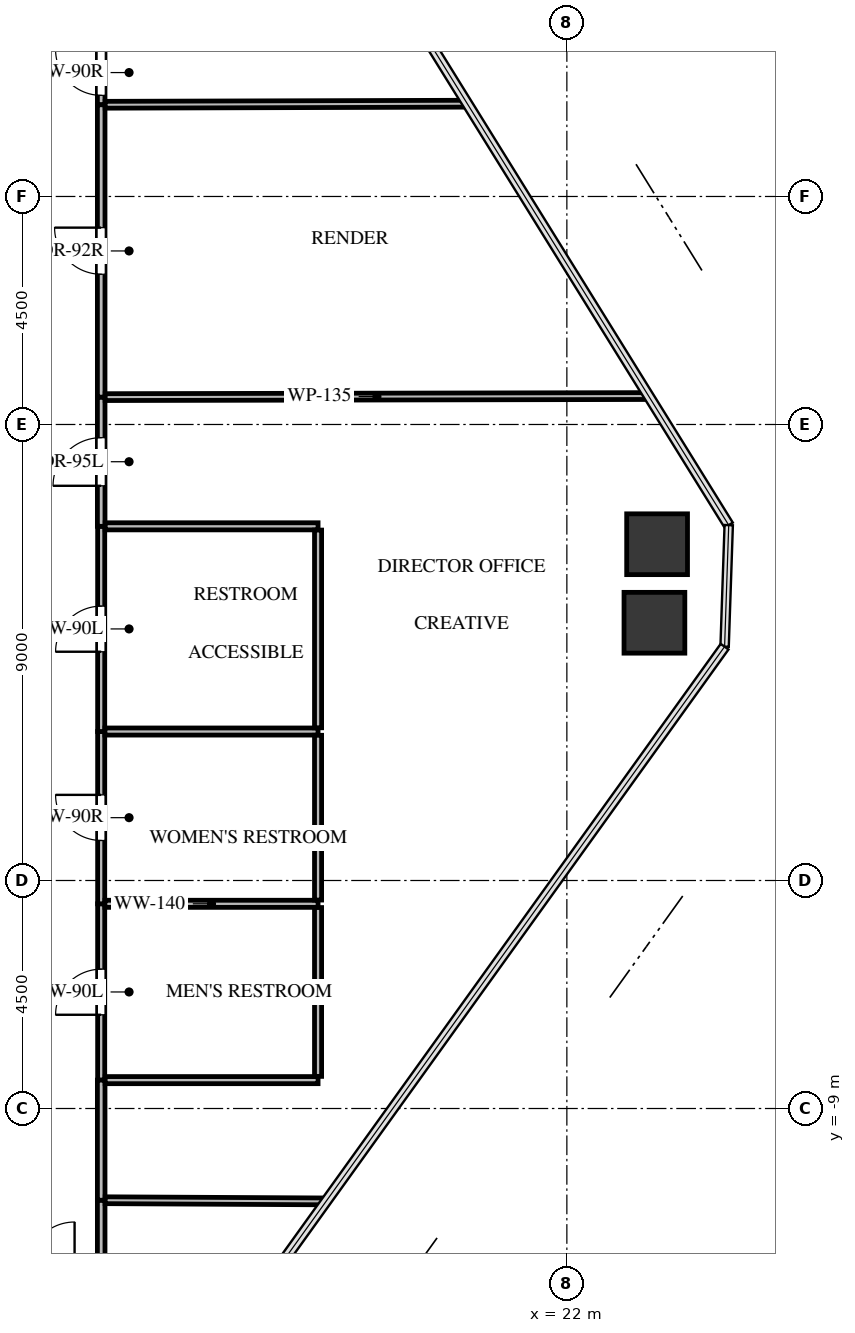
"""IFC4 building model, lengths in metres.
Left out: names, types, materials, properties, quantities, classifications, styles, units other than length and angle.
Written with IfcOpenShell. Run it as: python <this file> out.ifc"""

import sys

from ifc_helpers import new_model, si_unit, direction, frame, frame_2d, origin, origin_2d, place, context, subcontext, project, spatial, rectangle, extrude, source, transform, mapped, element, fill, save


model = new_model("IFC4")
c1 = context("Model", 3, precision=1e-05, world=origin(), true_north=direction((0.0, 1.0)))
c2 = subcontext(c1, "Body", "Model", "MODEL_VIEW")
j1 = project(units=[si_unit("LENGTHUNIT", "METRE"), si_unit("PLANEANGLEUNIT", "RADIAN")], contexts=[c1])
p1 = place(None, origin())
s1 = spatial("IfcSite", under=j1, at=p1, CompositionType="ELEMENT")
p2 = place(p1, origin())
s2 = spatial("IfcBuilding", under=s1, at=p2, CompositionType="ELEMENT")
p3 = place(p2, frame((0.0, 0.0, 110.7)))
s3 = spatial("IfcBuildingStorey", under=s2, at=p3, CompositionType="ELEMENT", Elevation=110.7)
m1 = source(origin(), c2, "Body", "SweptSolid", [
    extrude(rectangle(XDim=1.2, YDim=1.2, at=origin_2d()), origin(), (0.0, 0.0, 1.0), 3.3),
])
for number, where, z_axis, x_axis in (
    (1, (23.781, 2.137, -0.24), (0.0, 0.0, 1.0), (1.0, 0.0, 0.0)),
    (2, (23.728, 0.587, -0.24), (0.0, 0.0, 1.0), (1.0, 0.0, 0.0)),
):
    element("IfcColumn", number, at=place(p3, frame(where, z_axis=z_axis, x_axis=x_axis)), inside=s3, PredefinedType="COLUMN", context=c2, shape_type="MappedRepresentation", body=[
        mapped(m1, transform((0.0, 0.0, 0.0), x_axis=(1.0, 0.0, 0.0), y_axis=(0.0, 1.0, 0.0), z_axis=(0.0, 0.0, 1.0), scale=1.0)),
    ])
p4 = place(p3, frame((12.81, -8.44, 0.0), z_axis=(0.0, 0.0, 1.0), x_axis=(0.0, 1.0, 0.0)))
e3 = element("IfcWall", 3, at=p4, inside=s3, PredefinedType="PARTITIONING", context=c2, shape_type="SweptSolid", body=[
    extrude(rectangle(XDim=3.48, YDim=0.14, at=frame_2d((1.74, 0.0))), origin(), (0.0, 0.0, 1.0), 3.045),
])
p5 = place(p4, frame((1.29, 0.0, 0.0)))
e4 = element("IfcOpeningElement", 4, at=p5, cuts=e3, PredefinedType="OPENING", context=c2, shape_type="SweptSolid", body=[
    extrude(rectangle(XDim=0.9, YDim=2.05, at=frame_2d((0.45, 1.025))), frame((0.0, 0.08, 0.0), z_axis=(0.0, -1.0, 0.0), x_axis=(1.0, 0.0, 0.0)), (0.0, 0.0, 1.0), 0.16),
])
p6 = place(p3, frame((12.81, -4.96, 0.0), z_axis=(0.0, 0.0, 1.0), x_axis=(0.0, 1.0, 0.0)))
e5 = element("IfcWall", 5, at=p6, inside=s3, PredefinedType="PARTITIONING", context=c2, shape_type="SweptSolid", body=[
    extrude(rectangle(XDim=3.4, YDim=0.14, at=frame_2d((1.7, 0.0))), origin(), (0.0, 0.0, 1.0), 3.045),
])
p7 = place(p6, frame((1.25, 0.0, 0.0)))
e6 = element("IfcOpeningElement", 6, at=p7, cuts=e5, PredefinedType="OPENING", context=c2, shape_type="SweptSolid", body=[
    extrude(rectangle(XDim=0.9, YDim=2.05, at=frame_2d((0.45, 1.025))), frame((0.0, 0.08, 0.0), z_axis=(0.0, -1.0, 0.0), x_axis=(1.0, 0.0, 0.0)), (0.0, 0.0, 1.0), 0.16),
])
p8 = place(p3, frame((12.81, -1.56, 0.0), z_axis=(0.0, 0.0, 1.0), x_axis=(0.0, 1.0, 0.0)))
e7 = element("IfcWall", 7, at=p8, inside=s3, PredefinedType="PARTITIONING", context=c2, shape_type="SweptSolid", body=[
    extrude(rectangle(XDim=4.05, YDim=0.14, at=frame_2d((2.025, 0.0))), origin(), (0.0, 0.0, 1.0), 2.212),
])
p9 = place(p8, frame((1.575, 0.0, 0.0)))
e8 = element("IfcOpeningElement", 8, at=p9, cuts=e7, PredefinedType="OPENING", context=c2, shape_type="SweptSolid", body=[
    extrude(rectangle(XDim=0.9, YDim=2.05, at=frame_2d((0.45, 1.025))), frame((0.0, 0.08, 0.0), z_axis=(0.0, -1.0, 0.0), x_axis=(1.0, 0.0, 0.0)), (0.0, 0.0, 1.0), 0.16),
])
p10 = place(p3, frame((12.81, 10.81, 0.0), z_axis=(0.0, 0.0, 1.0), x_axis=(0.0, 1.0, 0.0)))
e9 = element("IfcWall", 9, at=p10, inside=s3, PredefinedType="PARTITIONING", context=c2, shape_type="SweptSolid", body=[
    extrude(rectangle(XDim=1.271, YDim=0.15, at=frame_2d((0.635, 0.0))), origin(), (0.0, 0.0, 1.0), 3.045),
])
p11 = place(p10, frame((0.186, 0.0, 0.0)))
e10 = element("IfcOpeningElement", 10, at=p11, cuts=e9, PredefinedType="OPENING", context=c2, shape_type="SweptSolid", body=[
    extrude(rectangle(XDim=0.9, YDim=2.05, at=frame_2d((0.45, 1.025))), frame((0.0, 0.085, 0.0), z_axis=(0.0, -1.0, 0.0), x_axis=(1.0, 0.0, 0.0)), (0.0, 0.0, 1.0), 0.17),
])
p12 = place(p3, frame((12.81, -12.081, 0.0), z_axis=(0.0, 0.0, 1.0), x_axis=(0.0, 1.0, 0.0)))
e11 = element("IfcWall", 11, at=p12, inside=s3, PredefinedType="PARTITIONING", context=c2, shape_type="SweptSolid", body=[
    extrude(rectangle(XDim=1.271, YDim=0.15, at=frame_2d((0.635, 0.0))), origin(), (0.0, 0.0, 1.0), 3.045),
])
p13 = place(p3, frame((12.81, 2.49, 0.0), z_axis=(0.0, 0.0, 1.0), x_axis=(0.0, 1.0, 0.0)))
e12 = element("IfcWall", 12, at=p13, inside=s3, PredefinedType="PARTITIONING", context=c2, shape_type="SweptSolid", body=[
    extrude(rectangle(XDim=2.55, YDim=0.15, at=frame_2d((1.275, 0.0))), origin(), (0.0, 0.0, 1.0), 3.045),
])
p14 = place(p13, frame((0.8, 0.0, 0.0)))
e13 = element("IfcOpeningElement", 13, at=p14, cuts=e12, PredefinedType="OPENING", context=c2, shape_type="SweptSolid", body=[
    extrude(rectangle(XDim=0.95, YDim=2.1, at=frame_2d((0.475, 1.05))), frame((0.0, 0.085, 0.0), z_axis=(0.0, -1.0, 0.0), x_axis=(1.0, 0.0, 0.0)), (0.0, 0.0, 1.0), 0.17),
])
p15 = place(p3, frame((12.81, -10.81, 0.0), z_axis=(0.0, 0.0, 1.0), x_axis=(0.0, 1.0, 0.0)))
e14 = element("IfcWall", 14, at=p15, inside=s3, PredefinedType="PARTITIONING", context=c2, shape_type="SweptSolid", body=[
    extrude(rectangle(XDim=2.37, YDim=0.15, at=frame_2d((1.185, 0.0))), origin(), (0.0, 0.0, 1.0), 3.045),
])
p16 = place(p3, frame((12.81, 5.04, 0.0), z_axis=(0.0, 0.0, 1.0), x_axis=(0.0, 1.0, 0.0)))
e15 = element("IfcWall", 15, at=p16, inside=s3, PredefinedType="PARTITIONING", context=c2, shape_type="SweptSolid", body=[
    extrude(rectangle(XDim=5.77, YDim=0.15, at=frame_2d((2.885, 0.0))), origin(), (0.0, 0.0, 1.0), 3.045),
])
p17 = place(p16, frame((2.425, 0.0, 0.0)))
e16 = element("IfcOpeningElement", 16, at=p17, cuts=e15, PredefinedType="OPENING", context=c2, shape_type="SweptSolid", body=[
    extrude(rectangle(XDim=0.92, YDim=2.1, at=frame_2d((0.46, 1.05))), frame((0.0, 0.085, 0.0), z_axis=(0.0, -1.0, 0.0), x_axis=(1.0, 0.0, 0.0)), (0.0, 0.0, 1.0), 0.17),
])
p18 = place(p3, frame((12.884, -4.96, 0.0), z_axis=(0.0, 0.0, 1.0), x_axis=(1.0, 0.0, 0.0)))
e17 = element("IfcWall", 17, at=p18, inside=s3, PredefinedType="PARTITIONING", context=c2, shape_type="SweptSolid", body=[
    extrude(rectangle(XDim=4.206, YDim=0.14, at=frame_2d((2.103, 0.0))), origin(), (0.0, 0.0, 1.0), 3.045),
])
p19 = place(p3, frame((17.09, -8.44, 0.0), z_axis=(0.0, 0.0, 1.0), x_axis=(-1.0, 0.0, 0.0)))
e18 = element("IfcWall", 18, at=p19, inside=s3, PredefinedType="PARTITIONING", context=c2, shape_type="SweptSolid", body=[
    extrude(rectangle(XDim=4.201, YDim=0.14, at=frame_2d((2.101, 0.0))), origin(), (0.0, 0.0, 1.0), 2.38),
])
p20 = place(p3, frame((17.09, -5.034, 0.0), z_axis=(0.0, 0.0, 1.0), x_axis=(0.0, -1.0, 0.0)))
e19 = element("IfcWall", 19, at=p20, inside=s3, PredefinedType="PARTITIONING", context=c2, shape_type="SweptSolid", body=[
    extrude(rectangle(XDim=3.332, YDim=0.14, at=frame_2d((1.666, 0.0))), origin(), (0.0, 0.0, 1.0), 2.38),
])
p21 = place(p3, frame((12.884, -1.56, 0.0), z_axis=(0.0, 0.0, 1.0), x_axis=(1.0, 0.0, 0.0)))
e20 = element("IfcWall", 20, at=p21, inside=s3, PredefinedType="PARTITIONING", context=c2, shape_type="SweptSolid", body=[
    extrude(rectangle(XDim=4.206, YDim=0.14, at=frame_2d((2.103, 0.0))), origin(), (0.0, 0.0, 1.0), 3.045),
])
p22 = place(p3, frame((17.09, -1.634, 0.0), z_axis=(0.0, 0.0, 1.0), x_axis=(0.0, -1.0, 0.0)))
e21 = element("IfcWall", 21, at=p22, inside=s3, PredefinedType="PARTITIONING", context=c2, shape_type="SweptSolid", body=[
    extrude(rectangle(XDim=3.252, YDim=0.14, at=frame_2d((1.626, 0.0))), origin(), (0.0, 0.0, 1.0), 3.045),
])
p23 = place(p3, frame((12.889, 2.49, 0.0), z_axis=(0.0, 0.0, 1.0), x_axis=(1.0, 0.0, 0.0)))
e22 = element("IfcWall", 22, at=p23, inside=s3, PredefinedType="PARTITIONING", context=c2, shape_type="SweptSolid", body=[
    extrude(rectangle(XDim=4.201, YDim=0.14, at=frame_2d((2.101, 0.0))), origin(), (0.0, 0.0, 1.0), 3.045),
])
p24 = place(p3, frame((17.09, 2.416, 0.0), z_axis=(0.0, 0.0, 1.0), x_axis=(0.0, -1.0, 0.0)))
e23 = element("IfcWall", 23, at=p24, inside=s3, PredefinedType="PARTITIONING", context=c2, shape_type="SweptSolid", body=[
    extrude(rectangle(XDim=3.902, YDim=0.14, at=frame_2d((1.951, 0.0))), origin(), (0.0, 0.0, 1.0), 2.212),
])
p25 = place(p3, frame((20.035, 10.831, 0.0), z_axis=(0.0, 0.0, 1.0), x_axis=(-0.999995783715, -0.002903885812, 0.0)))
e24 = element("IfcWall", 24, at=p25, inside=s3, PredefinedType="PARTITIONING", context=c2, shape_type="SweptSolid", body=[
    extrude(rectangle(XDim=7.146, YDim=0.135, at=frame_2d((3.573, 0.0))), origin(), (0.0, 0.0, 1.0), 2.38),
])
p26 = place(p3, frame((12.889, -10.81, 0.0), z_axis=(0.0, 0.0, 1.0), x_axis=(0.999986140562, -0.005264853658, 0.0)))
e25 = element("IfcWall", 25, at=p26, inside=s3, PredefinedType="PARTITIONING", context=c2, shape_type="SweptSolid", body=[
    extrude(rectangle(XDim=4.359, YDim=0.135, at=frame_2d((2.179, 0.0))), origin(), (0.0, 0.0, 1.0), 2.38),
])
p27 = place(p3, frame((12.889, 5.04, 0.0), z_axis=(0.0, 0.0, 1.0), x_axis=(0.999998128178, 0.00193484876, 0.0)))
e26 = element("IfcWall", 26, at=p27, inside=s3, PredefinedType="PARTITIONING", context=c2, shape_type="SweptSolid", body=[
    extrude(rectangle(XDim=10.725, YDim=0.135, at=frame_2d((5.363, 0.0))), origin(), (0.0, 0.0, 1.0), 2.38),
])
m2 = source(origin(), c2, "Body", "SweptSolid", [
    extrude(rectangle(XDim=0.9, YDim=2.05, at=frame_2d((0.45, 1.025))), frame((0.0, 0.025, 0.0), z_axis=(0.0, -1.0, 0.0), x_axis=(1.0, 0.0, 0.0)), (0.0, 0.0, 1.0), 0.05),
])
p28 = place(p5, origin())
e27 = element("IfcDoor", 27, at=p28, inside=s3, OperationType="SINGLE_SWING_LEFT", PredefinedType="DOOR", context=c2, shape_type="MappedRepresentation", body=[
    mapped(m2, transform((0.0, 0.0, 0.0), x_axis=(1.0, 0.0, 0.0), y_axis=(0.0, 1.0, 0.0), z_axis=(0.0, 0.0, 1.0), scale=1.0)),
])
fill(e4, e27)
m3 = source(origin(), c2, "Body", "SweptSolid", [
    extrude(rectangle(XDim=0.9, YDim=2.05, at=frame_2d((0.45, 1.025))), frame((0.0, 0.025, 0.0), z_axis=(0.0, -1.0, 0.0), x_axis=(1.0, 0.0, 0.0)), (0.0, 0.0, 1.0), 0.05),
])
p29 = place(p7, origin())
e28 = element("IfcDoor", 28, at=p29, inside=s3, OperationType="SINGLE_SWING_RIGHT", PredefinedType="DOOR", context=c2, shape_type="MappedRepresentation", body=[
    mapped(m3, transform((0.0, 0.0, 0.0), x_axis=(1.0, 0.0, 0.0), y_axis=(0.0, 1.0, 0.0), z_axis=(0.0, 0.0, 1.0), scale=1.0)),
])
fill(e6, e28)
p30 = place(p9, origin())
e29 = element("IfcDoor", 29, at=p30, inside=s3, OperationType="SINGLE_SWING_LEFT", PredefinedType="DOOR", context=c2, shape_type="MappedRepresentation", body=[
    mapped(m2, transform((0.0, 0.0, 0.0), x_axis=(1.0, 0.0, 0.0), y_axis=(0.0, 1.0, 0.0), z_axis=(0.0, 0.0, 1.0), scale=1.0)),
])
fill(e8, e29)
p31 = place(p11, origin())
e30 = element("IfcDoor", 30, at=p31, inside=s3, OperationType="SINGLE_SWING_RIGHT", PredefinedType="DOOR", context=c2, shape_type="MappedRepresentation", body=[
    mapped(m3, transform((0.0, 0.0, 0.0), x_axis=(1.0, 0.0, 0.0), y_axis=(0.0, 1.0, 0.0), z_axis=(0.0, 0.0, 1.0), scale=1.0)),
])
fill(e10, e30)
m4 = source(origin(), c2, "Body", "SweptSolid", [
    extrude(rectangle(XDim=0.95, YDim=2.1, at=frame_2d((0.475, 1.05))), frame((0.0, 0.025, 0.0), z_axis=(0.0, -1.0, 0.0), x_axis=(1.0, 0.0, 0.0)), (0.0, 0.0, 1.0), 0.05),
])
p32 = place(p14, origin())
e31 = element("IfcDoor", 31, at=p32, inside=s3, OperationType="SINGLE_SWING_LEFT", PredefinedType="DOOR", context=c2, shape_type="MappedRepresentation", body=[
    mapped(m4, transform((0.0, 0.0, 0.0), x_axis=(1.0, 0.0, 0.0), y_axis=(0.0, 1.0, 0.0), z_axis=(0.0, 0.0, 1.0), scale=1.0)),
])
fill(e13, e31)
m5 = source(origin(), c2, "Body", "SweptSolid", [
    extrude(rectangle(XDim=0.92, YDim=2.1, at=frame_2d((0.46, 1.05))), frame((0.0, 0.025, 0.0), z_axis=(0.0, -1.0, 0.0), x_axis=(1.0, 0.0, 0.0)), (0.0, 0.0, 1.0), 0.05),
])
p33 = place(p17, origin())
e32 = element("IfcDoor", 32, at=p33, inside=s3, OperationType="SINGLE_SWING_RIGHT", PredefinedType="DOOR", context=c2, shape_type="MappedRepresentation", body=[
    mapped(m5, transform((0.0, 0.0, 0.0), x_axis=(1.0, 0.0, 0.0), y_axis=(0.0, 1.0, 0.0), z_axis=(0.0, 0.0, 1.0), scale=1.0)),
])
fill(e16, e32)
save(model, sys.argv[1])
